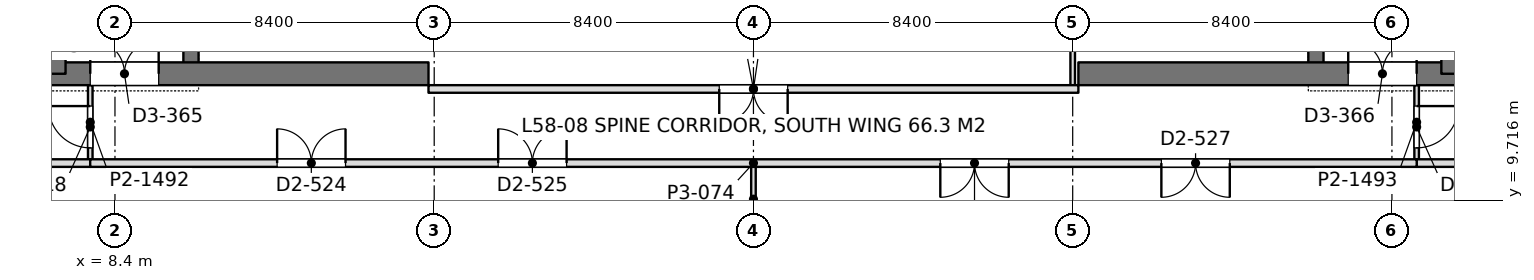
"""IFC4 building model, lengths in metres.
Left out: names, types, materials, properties, quantities, classifications, styles, units other than length and angle.
Written with IfcOpenShell. Run it as: python <this file> out.ifc"""

import sys

from ifc_helpers import new_model, si_unit, direction, frame, frame_2d, origin, place, context, subcontext, project, spatial, rectangle, extrude, element, fill, save


model = new_model("IFC4")
c1 = context("Model", 3, precision=1e-05, world=origin(), true_north=direction((0.0, 1.0)))
c2 = subcontext(c1, "Body", "Model", "MODEL_VIEW")
j1 = project(units=[si_unit("LENGTHUNIT", "METRE"), si_unit("PLANEANGLEUNIT", "RADIAN")], contexts=[c1])
p1 = place(None, origin())
s1 = spatial("IfcSite", under=j1, at=p1, CompositionType="ELEMENT")
p2 = place(p1, origin())
s2 = spatial("IfcBuilding", under=s1, at=p2, CompositionType="ELEMENT")
p3 = place(p2, frame((0.0, 0.0, 254.7)))
s3 = spatial("IfcBuildingStorey", under=s2, at=p3, CompositionType="ELEMENT", Elevation=254.7)
p4 = place(p3, frame((-1.05, 13.05, 0.0), z_axis=(0.0, 0.0, 1.0), x_axis=(1.0, 0.0, 0.0)))
e1 = element("IfcWall", 1, at=p4, inside=s3, PredefinedType="SHEAR", context=c2, shape_type="SweptSolid", body=[
    extrude(rectangle(XDim=17.7, YDim=0.6, at=frame_2d((8.85, 0.0))), origin(), (0.0, 0.0, 1.0), 4.5),
])
p5 = place(p4, frame((8.8, 0.0, 0.0)))
e2 = element("IfcOpeningElement", 2, at=p5, cuts=e1, PredefinedType="OPENING", context=c2, shape_type="SweptSolid", body=[
    extrude(rectangle(XDim=1.8, YDim=2.4, at=frame_2d((0.9, 1.2))), frame((0.0, 0.31, 0.0), z_axis=(0.0, -1.0, 0.0), x_axis=(1.0, 0.0, 0.0)), (0.0, 0.0, 1.0), 0.62),
])
p6 = place(p3, frame((6.9, 13.05, 0.0), z_axis=(0.0, 0.0, 1.0), x_axis=(0.0, 1.0, 0.0)))
e3 = element("IfcWall", 3, at=p6, inside=s3, PredefinedType="SHEAR", context=c2, shape_type="SweptSolid", body=[
    extrude(rectangle(XDim=24.3, YDim=0.4, at=frame_2d((12.15, 0.0))), origin(), (0.0, 0.0, 1.0), 4.5),
])
p7 = place(p6, frame((1.3, 0.0, 0.0)))
e4 = element("IfcOpeningElement", 4, at=p7, cuts=e3, PredefinedType="OPENING", context=c2, shape_type="SweptSolid", body=[
    extrude(rectangle(XDim=1.0, YDim=2.2, at=frame_2d((0.5, 1.1))), frame((0.0, 0.21, 0.0), z_axis=(0.0, -1.0, 0.0), x_axis=(1.0, 0.0, 0.0)), (0.0, 0.0, 1.0), 0.42),
])
p8 = place(p6, frame((22.0, 0.0, 0.0)))
e5 = element("IfcOpeningElement", 5, at=p8, cuts=e3, PredefinedType="OPENING", context=c2, shape_type="SweptSolid", body=[
    extrude(rectangle(XDim=1.0, YDim=2.2, at=frame_2d((0.5, 1.1))), frame((0.0, 0.21, 0.0), z_axis=(0.0, -1.0, 0.0), x_axis=(1.0, 0.0, 0.0)), (0.0, 0.0, 1.0), 0.42),
])
p9 = place(p6, frame((5.55, 0.0, 0.0)))
e6 = element("IfcOpeningElement", 6, at=p9, cuts=e3, PredefinedType="OPENING", context=c2, shape_type="SweptSolid", body=[
    extrude(rectangle(XDim=1.0, YDim=2.2, at=frame_2d((0.5, 1.1))), frame((0.0, 0.21, 0.0), z_axis=(0.0, -1.0, 0.0), x_axis=(1.0, 0.0, 0.0)), (0.0, 0.0, 1.0), 0.42),
])
p10 = place(p6, frame((9.55, 0.0, 0.0)))
e7 = element("IfcOpeningElement", 7, at=p10, cuts=e3, PredefinedType="OPENING", context=c2, shape_type="SweptSolid", body=[
    extrude(rectangle(XDim=1.0, YDim=2.2, at=frame_2d((0.5, 1.1))), frame((0.0, 0.21, 0.0), z_axis=(0.0, -1.0, 0.0), x_axis=(1.0, 0.0, 0.0)), (0.0, 0.0, 1.0), 0.42),
])
p11 = place(p6, frame((12.8, 0.0, 0.0)))
e8 = element("IfcOpeningElement", 8, at=p11, cuts=e3, PredefinedType="OPENING", context=c2, shape_type="SweptSolid", body=[
    extrude(rectangle(XDim=1.1, YDim=2.2, at=frame_2d((0.55, 1.1))), frame((0.0, 0.21, 0.0), z_axis=(0.0, -1.0, 0.0), x_axis=(1.0, 0.0, 0.0)), (0.0, 0.0, 1.0), 0.42),
])
p12 = place(p6, frame((15.538, 0.0, 0.0)))
e9 = element("IfcOpeningElement", 9, at=p12, cuts=e3, PredefinedType="OPENING", context=c2, shape_type="SweptSolid", body=[
    extrude(rectangle(XDim=1.1, YDim=2.2, at=frame_2d((0.55, 1.1))), frame((0.0, 0.21, 0.0), z_axis=(0.0, -1.0, 0.0), x_axis=(1.0, 0.0, 0.0)), (0.0, 0.0, 1.0), 0.42),
])
p13 = place(p6, frame((18.262, 0.0, 0.0)))
e10 = element("IfcOpeningElement", 10, at=p13, cuts=e3, PredefinedType="OPENING", context=c2, shape_type="SweptSolid", body=[
    extrude(rectangle(XDim=1.1, YDim=2.2, at=frame_2d((0.55, 1.1))), frame((0.0, 0.21, 0.0), z_axis=(0.0, -1.0, 0.0), x_axis=(1.0, 0.0, 0.0)), (0.0, 0.0, 1.0), 0.42),
])
p14 = place(p3, frame((10.4, 13.05, 0.0), z_axis=(0.0, 0.0, 1.0), x_axis=(0.0, 1.0, 0.0)))
e11 = element("IfcWall", 11, at=p14, inside=s3, PredefinedType="SHEAR", context=c2, shape_type="SweptSolid", body=[
    extrude(rectangle(XDim=24.3, YDim=0.4, at=frame_2d((12.15, 0.0))), origin(), (0.0, 0.0, 1.0), 4.5),
])
p15 = place(p14, frame((15.75, 0.0, 0.0)))
e12 = element("IfcOpeningElement", 12, at=p15, cuts=e11, PredefinedType="OPENING", context=c2, shape_type="SweptSolid", body=[
    extrude(rectangle(XDim=1.1, YDim=2.2, at=frame_2d((0.55, 1.1))), frame((0.0, 0.21, 0.0), z_axis=(0.0, -1.0, 0.0), x_axis=(1.0, 0.0, 0.0)), (0.0, 0.0, 1.0), 0.42),
])
p16 = place(p14, frame((18.6, 0.0, 0.0)))
e13 = element("IfcOpeningElement", 13, at=p16, cuts=e11, PredefinedType="OPENING", context=c2, shape_type="SweptSolid", body=[
    extrude(rectangle(XDim=1.1, YDim=2.2, at=frame_2d((0.55, 1.1))), frame((0.0, 0.21, 0.0), z_axis=(0.0, -1.0, 0.0), x_axis=(1.0, 0.0, 0.0)), (0.0, 0.0, 1.0), 0.42),
])
p17 = place(p14, frame((21.45, 0.0, 0.0)))
e14 = element("IfcOpeningElement", 14, at=p17, cuts=e11, PredefinedType="OPENING", context=c2, shape_type="SweptSolid", body=[
    extrude(rectangle(XDim=1.1, YDim=2.2, at=frame_2d((0.55, 1.1))), frame((0.0, 0.21, 0.0), z_axis=(0.0, -1.0, 0.0), x_axis=(1.0, 0.0, 0.0)), (0.0, 0.0, 1.0), 0.42),
])
p18 = place(p14, frame((8.65, 0.0, 0.0)))
e15 = element("IfcOpeningElement", 15, at=p18, cuts=e11, PredefinedType="OPENING", context=c2, shape_type="SweptSolid", body=[
    extrude(rectangle(XDim=1.8, YDim=2.4, at=frame_2d((0.9, 1.2))), frame((0.0, 0.21, 0.0), z_axis=(0.0, -1.0, 0.0), x_axis=(1.0, 0.0, 0.0)), (0.0, 0.0, 1.0), 0.42),
])
p19 = place(p3, frame((33.75, 13.05, 0.0), z_axis=(0.0, 0.0, 1.0), x_axis=(1.0, 0.0, 0.0)))
e16 = element("IfcWall", 16, at=p19, inside=s3, PredefinedType="SHEAR", context=c2, shape_type="SweptSolid", body=[
    extrude(rectangle(XDim=17.7, YDim=0.6, at=frame_2d((8.85, 0.0))), origin(), (0.0, 0.0, 1.0), 4.5),
])
p20 = place(p19, frame((7.1, 0.0, 0.0)))
e17 = element("IfcOpeningElement", 17, at=p20, cuts=e16, PredefinedType="OPENING", context=c2, shape_type="SweptSolid", body=[
    extrude(rectangle(XDim=1.8, YDim=2.4, at=frame_2d((0.9, 1.2))), frame((0.0, 0.31, 0.0), z_axis=(0.0, -1.0, 0.0), x_axis=(1.0, 0.0, 0.0)), (0.0, 0.0, 1.0), 0.62),
])
p21 = place(p3, frame((43.5, 13.05, 0.0), z_axis=(0.0, 0.0, 1.0), x_axis=(0.0, 1.0, 0.0)))
e18 = element("IfcWall", 18, at=p21, inside=s3, PredefinedType="SHEAR", context=c2, shape_type="SweptSolid", body=[
    extrude(rectangle(XDim=24.3, YDim=0.4, at=frame_2d((12.15, 0.0))), origin(), (0.0, 0.0, 1.0), 4.5),
])
p22 = place(p21, frame((1.3, 0.0, 0.0)))
e19 = element("IfcOpeningElement", 19, at=p22, cuts=e18, PredefinedType="OPENING", context=c2, shape_type="SweptSolid", body=[
    extrude(rectangle(XDim=1.0, YDim=2.2, at=frame_2d((0.5, 1.1))), frame((0.0, 0.21, 0.0), z_axis=(0.0, -1.0, 0.0), x_axis=(1.0, 0.0, 0.0)), (0.0, 0.0, 1.0), 0.42),
])
p23 = place(p21, frame((22.0, 0.0, 0.0)))
e20 = element("IfcOpeningElement", 20, at=p23, cuts=e18, PredefinedType="OPENING", context=c2, shape_type="SweptSolid", body=[
    extrude(rectangle(XDim=1.0, YDim=2.2, at=frame_2d((0.5, 1.1))), frame((0.0, 0.21, 0.0), z_axis=(0.0, -1.0, 0.0), x_axis=(1.0, 0.0, 0.0)), (0.0, 0.0, 1.0), 0.42),
])
p24 = place(p21, frame((5.55, 0.0, 0.0)))
e21 = element("IfcOpeningElement", 21, at=p24, cuts=e18, PredefinedType="OPENING", context=c2, shape_type="SweptSolid", body=[
    extrude(rectangle(XDim=1.0, YDim=2.2, at=frame_2d((0.5, 1.1))), frame((0.0, 0.21, 0.0), z_axis=(0.0, -1.0, 0.0), x_axis=(1.0, 0.0, 0.0)), (0.0, 0.0, 1.0), 0.42),
])
p25 = place(p21, frame((9.55, 0.0, 0.0)))
e22 = element("IfcOpeningElement", 22, at=p25, cuts=e18, PredefinedType="OPENING", context=c2, shape_type="SweptSolid", body=[
    extrude(rectangle(XDim=1.0, YDim=2.2, at=frame_2d((0.5, 1.1))), frame((0.0, 0.21, 0.0), z_axis=(0.0, -1.0, 0.0), x_axis=(1.0, 0.0, 0.0)), (0.0, 0.0, 1.0), 0.42),
])
p26 = place(p21, frame((12.8, 0.0, 0.0)))
e23 = element("IfcOpeningElement", 23, at=p26, cuts=e18, PredefinedType="OPENING", context=c2, shape_type="SweptSolid", body=[
    extrude(rectangle(XDim=1.1, YDim=2.2, at=frame_2d((0.55, 1.1))), frame((0.0, 0.21, 0.0), z_axis=(0.0, -1.0, 0.0), x_axis=(1.0, 0.0, 0.0)), (0.0, 0.0, 1.0), 0.42),
])
p27 = place(p21, frame((15.538, 0.0, 0.0)))
e24 = element("IfcOpeningElement", 24, at=p27, cuts=e18, PredefinedType="OPENING", context=c2, shape_type="SweptSolid", body=[
    extrude(rectangle(XDim=1.1, YDim=2.2, at=frame_2d((0.55, 1.1))), frame((0.0, 0.21, 0.0), z_axis=(0.0, -1.0, 0.0), x_axis=(1.0, 0.0, 0.0)), (0.0, 0.0, 1.0), 0.42),
])
p28 = place(p21, frame((18.262, 0.0, 0.0)))
e25 = element("IfcOpeningElement", 25, at=p28, cuts=e18, PredefinedType="OPENING", context=c2, shape_type="SweptSolid", body=[
    extrude(rectangle(XDim=1.1, YDim=2.2, at=frame_2d((0.55, 1.1))), frame((0.0, 0.21, 0.0), z_axis=(0.0, -1.0, 0.0), x_axis=(1.0, 0.0, 0.0)), (0.0, 0.0, 1.0), 0.42),
])
p29 = place(p3, frame((40.0, 13.05, 0.0), z_axis=(0.0, 0.0, 1.0), x_axis=(0.0, 1.0, 0.0)))
e26 = element("IfcWall", 26, at=p29, inside=s3, PredefinedType="SHEAR", context=c2, shape_type="SweptSolid", body=[
    extrude(rectangle(XDim=24.3, YDim=0.4, at=frame_2d((12.15, 0.0))), origin(), (0.0, 0.0, 1.0), 4.5),
])
p30 = place(p29, frame((15.75, 0.0, 0.0)))
e27 = element("IfcOpeningElement", 27, at=p30, cuts=e26, PredefinedType="OPENING", context=c2, shape_type="SweptSolid", body=[
    extrude(rectangle(XDim=1.1, YDim=2.2, at=frame_2d((0.55, 1.1))), frame((0.0, 0.21, 0.0), z_axis=(0.0, -1.0, 0.0), x_axis=(1.0, 0.0, 0.0)), (0.0, 0.0, 1.0), 0.42),
])
p31 = place(p29, frame((18.6, 0.0, 0.0)))
e28 = element("IfcOpeningElement", 28, at=p31, cuts=e26, PredefinedType="OPENING", context=c2, shape_type="SweptSolid", body=[
    extrude(rectangle(XDim=1.1, YDim=2.2, at=frame_2d((0.55, 1.1))), frame((0.0, 0.21, 0.0), z_axis=(0.0, -1.0, 0.0), x_axis=(1.0, 0.0, 0.0)), (0.0, 0.0, 1.0), 0.42),
])
p32 = place(p29, frame((21.45, 0.0, 0.0)))
e29 = element("IfcOpeningElement", 29, at=p32, cuts=e26, PredefinedType="OPENING", context=c2, shape_type="SweptSolid", body=[
    extrude(rectangle(XDim=1.1, YDim=2.2, at=frame_2d((0.55, 1.1))), frame((0.0, 0.21, 0.0), z_axis=(0.0, -1.0, 0.0), x_axis=(1.0, 0.0, 0.0)), (0.0, 0.0, 1.0), 0.42),
])
p33 = place(p29, frame((8.65, 0.0, 0.0)))
e30 = element("IfcOpeningElement", 30, at=p33, cuts=e26, PredefinedType="OPENING", context=c2, shape_type="SweptSolid", body=[
    extrude(rectangle(XDim=1.8, YDim=2.4, at=frame_2d((0.9, 1.2))), frame((0.0, 0.21, 0.0), z_axis=(0.0, -1.0, 0.0), x_axis=(1.0, 0.0, 0.0)), (0.0, 0.0, 1.0), 0.42),
])
p34 = place(p29, frame((1.5, 0.0, 0.0)))
e31 = element("IfcOpeningElement", 31, at=p34, cuts=e26, PredefinedType="OPENING", context=c2, shape_type="SweptSolid", body=[
    extrude(rectangle(XDim=1.8, YDim=2.4, at=frame_2d((0.9, 1.2))), frame((0.0, 0.21, 0.0), z_axis=(0.0, -1.0, 0.0), x_axis=(1.0, 0.0, 0.0)), (0.0, 0.0, 1.0), 0.42),
])
p35 = place(p3, frame((33.6, 12.6, 0.0), z_axis=(0.0, 0.0, 1.0), x_axis=(0.0, 1.0, 0.0)))
e32 = element("IfcWall", 32, at=p35, inside=s3, PredefinedType="PARTITIONING", context=c2, shape_type="SweptSolid", body=[
    extrude(rectangle(XDim=4.502, YDim=0.12, at=frame_2d((2.251, 0.0))), origin(), (0.0, 0.0, 1.0), 3.66),
])
p36 = place(p3, frame((25.2, 8.899, 0.0), z_axis=(0.0, 0.0, 1.0), x_axis=(0.0, 1.0, 0.0)))
e33 = element("IfcWall", 33, at=p36, inside=s3, PredefinedType="PARTITIONING", context=c2, shape_type="SweptSolid", body=[
    extrude(rectangle(XDim=1.703, YDim=0.12, at=frame_2d((0.852, 0.0))), origin(), (0.0, 0.0, 1.0), 3.8),
])
p37 = place(p3, frame((7.748, 10.7, 0.0), z_axis=(0.0, 0.0, 1.0), x_axis=(1.0, 0.0, 0.0)))
e34 = element("IfcWall", 34, at=p37, inside=s3, PredefinedType="PARTITIONING", context=c2, shape_type="SweptSolid", body=[
    extrude(rectangle(XDim=34.904, YDim=0.2, at=frame_2d((17.452, 0.0))), origin(), (0.0, 0.0, 1.0), 3.8),
])
p38 = place(p37, frame((4.919, 0.0, 0.0)))
e35 = element("IfcOpeningElement", 35, at=p38, cuts=e34, PredefinedType="OPENING", context=c2, shape_type="SweptSolid", body=[
    extrude(rectangle(XDim=1.8, YDim=2.2, at=frame_2d((0.9, 1.1))), frame((0.0, 0.11, 0.0), z_axis=(0.0, -1.0, 0.0), x_axis=(1.0, 0.0, 0.0)), (0.0, 0.0, 1.0), 0.22),
])
p39 = place(p37, frame((10.735, 0.0, 0.0)))
e36 = element("IfcOpeningElement", 36, at=p39, cuts=e34, PredefinedType="OPENING", context=c2, shape_type="SweptSolid", body=[
    extrude(rectangle(XDim=1.8, YDim=2.2, at=frame_2d((0.9, 1.1))), frame((0.0, 0.11, 0.0), z_axis=(0.0, -1.0, 0.0), x_axis=(1.0, 0.0, 0.0)), (0.0, 0.0, 1.0), 0.22),
])
p40 = place(p37, frame((22.369, 0.0, 0.0)))
e37 = element("IfcOpeningElement", 37, at=p40, cuts=e34, PredefinedType="OPENING", context=c2, shape_type="SweptSolid", body=[
    extrude(rectangle(XDim=1.8, YDim=2.2, at=frame_2d((0.9, 1.1))), frame((0.0, 0.11, 0.0), z_axis=(0.0, -1.0, 0.0), x_axis=(1.0, 0.0, 0.0)), (0.0, 0.0, 1.0), 0.22),
])
p41 = place(p37, frame((28.185, 0.0, 0.0)))
e38 = element("IfcOpeningElement", 38, at=p41, cuts=e34, PredefinedType="OPENING", context=c2, shape_type="SweptSolid", body=[
    extrude(rectangle(XDim=1.8, YDim=2.2, at=frame_2d((0.9, 1.1))), frame((0.0, 0.11, 0.0), z_axis=(0.0, -1.0, 0.0), x_axis=(1.0, 0.0, 0.0)), (0.0, 0.0, 1.0), 0.22),
])
p42 = place(p3, frame((7.75, 10.798, 0.0), z_axis=(0.0, 0.0, 1.0), x_axis=(0.0, 1.0, 0.0)))
e39 = element("IfcWall", 39, at=p42, inside=s3, PredefinedType="PARTITIONING", context=c2, shape_type="SweptSolid", body=[
    extrude(rectangle(XDim=1.954, YDim=0.12, at=frame_2d((0.977, 0.0))), origin(), (0.0, 0.0, 1.0), 4.35),
])
p43 = place(p42, frame((0.302, 0.0, 0.0)))
e40 = element("IfcOpeningElement", 40, at=p43, cuts=e39, PredefinedType="OPENING", context=c2, shape_type="SweptSolid", body=[
    extrude(rectangle(XDim=1.1, YDim=2.4, at=frame_2d((0.55, 1.2))), frame((0.0, 0.07, 0.0), z_axis=(0.0, -1.0, 0.0), x_axis=(1.0, 0.0, 0.0)), (0.0, 0.0, 1.0), 0.14),
])
p44 = place(p3, frame((42.65, 10.798, 0.0), z_axis=(0.0, 0.0, 1.0), x_axis=(0.0, 1.0, 0.0)))
e41 = element("IfcWall", 41, at=p44, inside=s3, PredefinedType="PARTITIONING", context=c2, shape_type="SweptSolid", body=[
    extrude(rectangle(XDim=1.954, YDim=0.12, at=frame_2d((0.977, 0.0))), origin(), (0.0, 0.0, 1.0), 4.35),
])
p45 = place(p44, frame((0.302, 0.0, 0.0)))
e42 = element("IfcOpeningElement", 42, at=p45, cuts=e41, PredefinedType="OPENING", context=c2, shape_type="SweptSolid", body=[
    extrude(rectangle(XDim=1.1, YDim=2.4, at=frame_2d((0.55, 1.2))), frame((0.0, 0.07, 0.0), z_axis=(0.0, -1.0, 0.0), x_axis=(1.0, 0.0, 0.0)), (0.0, 0.0, 1.0), 0.14),
])
for number, where, z_axis, x_axis in (
    (43, (1.2, 10.7, 0.0), (0.0, 0.0, 1.0), (1.0, 0.0, 0.0)),
    (44, (42.648, 10.7, 0.0), (0.0, 0.0, 1.0), (1.0, 0.0, 0.0)),
):
    element("IfcWall", number, at=place(p3, frame(where, z_axis=z_axis, x_axis=x_axis)), inside=s3, PredefinedType="PARTITIONING", context=c2, shape_type="SweptSolid", body=[
        extrude(rectangle(XDim=6.552, YDim=0.2, at=frame_2d((3.276, 0.0))), origin(), (0.0, 0.0, 1.0), 4.35),
    ])
p46 = place(p3, frame((16.65, 12.65, 0.0), z_axis=(0.0, 0.0, 1.0), x_axis=(1.0, 0.0, 0.0)))
e45 = element("IfcWall", 45, at=p46, inside=s3, PredefinedType="PARTITIONING", context=c2, shape_type="SweptSolid", body=[
    extrude(rectangle(XDim=17.1, YDim=0.2, at=frame_2d((8.55, 0.0))), origin(), (0.0, 0.0, 1.0), 3.8),
])
p47 = place(p46, frame((7.65, 0.0, 0.0)))
e46 = element("IfcOpeningElement", 46, at=p47, cuts=e45, PredefinedType="OPENING", context=c2, shape_type="SweptSolid", body=[
    extrude(rectangle(XDim=1.8, YDim=2.2, at=frame_2d((0.9, 1.1))), frame((0.0, 0.11, 0.0), z_axis=(0.0, -1.0, 0.0), x_axis=(1.0, 0.0, 0.0)), (0.0, 0.0, 1.0), 0.22),
])
p48 = place(p5, origin())
e47 = element("IfcDoor", 47, at=p48, inside=s3, OperationType="DOUBLE_DOOR_SINGLE_SWING", PredefinedType="DOOR", context=c2, shape_type="SweptSolid", body=[
    extrude(rectangle(XDim=1.8, YDim=2.4, at=frame_2d((0.9, 1.2))), frame((0.0, 0.025, 0.0), z_axis=(0.0, -1.0, 0.0), x_axis=(1.0, 0.0, 0.0)), (0.0, 0.0, 1.0), 0.05),
])
fill(e2, e47)
p49 = place(p20, origin())
e48 = element("IfcDoor", 48, at=p49, inside=s3, OperationType="DOUBLE_DOOR_SINGLE_SWING", PredefinedType="DOOR", context=c2, shape_type="SweptSolid", body=[
    extrude(rectangle(XDim=1.8, YDim=2.4, at=frame_2d((0.9, 1.2))), frame((0.0, 0.025, 0.0), z_axis=(0.0, -1.0, 0.0), x_axis=(1.0, 0.0, 0.0)), (0.0, 0.0, 1.0), 0.05),
])
fill(e17, e48)
p50 = place(p38, origin())
e49 = element("IfcDoor", 49, at=p50, inside=s3, OperationType="DOUBLE_DOOR_SINGLE_SWING", PredefinedType="DOOR", context=c2, shape_type="SweptSolid", body=[
    extrude(rectangle(XDim=1.8, YDim=2.2, at=frame_2d((0.9, 1.1))), frame((0.0, 0.025, 0.0), z_axis=(0.0, -1.0, 0.0), x_axis=(1.0, 0.0, 0.0)), (0.0, 0.0, 1.0), 0.05),
])
fill(e35, e49)
p51 = place(p39, origin())
e50 = element("IfcDoor", 50, at=p51, inside=s3, OperationType="DOUBLE_DOOR_SINGLE_SWING", PredefinedType="DOOR", context=c2, shape_type="SweptSolid", body=[
    extrude(rectangle(XDim=1.8, YDim=2.2, at=frame_2d((0.9, 1.1))), frame((0.0, 0.025, 0.0), z_axis=(0.0, -1.0, 0.0), x_axis=(1.0, 0.0, 0.0)), (0.0, 0.0, 1.0), 0.05),
])
fill(e36, e50)
p52 = place(p40, frame((1.8, 0.0, 0.0), z_axis=(0.0, 0.0, 1.0), x_axis=(-1.0, 0.0, 0.0)))
e51 = element("IfcDoor", 51, at=p52, inside=s3, OperationType="DOUBLE_DOOR_SINGLE_SWING", PredefinedType="DOOR", context=c2, shape_type="SweptSolid", body=[
    extrude(rectangle(XDim=1.8, YDim=2.2, at=frame_2d((0.9, 1.1))), frame((0.0, 0.025, 0.0), z_axis=(0.0, -1.0, 0.0), x_axis=(1.0, 0.0, 0.0)), (0.0, 0.0, 1.0), 0.05),
])
fill(e37, e51)
p53 = place(p41, frame((1.8, 0.0, 0.0), z_axis=(0.0, 0.0, 1.0), x_axis=(-1.0, 0.0, 0.0)))
e52 = element("IfcDoor", 52, at=p53, inside=s3, OperationType="DOUBLE_DOOR_SINGLE_SWING", PredefinedType="DOOR", context=c2, shape_type="SweptSolid", body=[
    extrude(rectangle(XDim=1.8, YDim=2.2, at=frame_2d((0.9, 1.1))), frame((0.0, 0.025, 0.0), z_axis=(0.0, -1.0, 0.0), x_axis=(1.0, 0.0, 0.0)), (0.0, 0.0, 1.0), 0.05),
])
fill(e38, e52)
p54 = place(p43, origin())
e53 = element("IfcDoor", 53, at=p54, inside=s3, OperationType="SINGLE_SWING_RIGHT", PredefinedType="DOOR", context=c2, shape_type="SweptSolid", body=[
    extrude(rectangle(XDim=1.1, YDim=2.4, at=frame_2d((0.55, 1.2))), frame((0.0, 0.025, 0.0), z_axis=(0.0, -1.0, 0.0), x_axis=(1.0, 0.0, 0.0)), (0.0, 0.0, 1.0), 0.05),
])
fill(e40, e53)
p55 = place(p45, frame((1.1, 0.0, 0.0), z_axis=(0.0, 0.0, 1.0), x_axis=(-1.0, 0.0, 0.0)))
e54 = element("IfcDoor", 54, at=p55, inside=s3, OperationType="SINGLE_SWING_LEFT", PredefinedType="DOOR", context=c2, shape_type="SweptSolid", body=[
    extrude(rectangle(XDim=1.1, YDim=2.4, at=frame_2d((0.55, 1.2))), frame((0.0, 0.025, 0.0), z_axis=(0.0, -1.0, 0.0), x_axis=(1.0, 0.0, 0.0)), (0.0, 0.0, 1.0), 0.05),
])
fill(e42, e54)
p56 = place(p47, frame((1.8, 0.0, 0.0), z_axis=(0.0, 0.0, 1.0), x_axis=(-1.0, 0.0, 0.0)))
e55 = element("IfcDoor", 55, at=p56, inside=s3, OperationType="DOUBLE_DOOR_SINGLE_SWING", PredefinedType="DOOR", context=c2, shape_type="SweptSolid", body=[
    extrude(rectangle(XDim=1.8, YDim=2.2, at=frame_2d((0.9, 1.1))), frame((0.0, 0.025, 0.0), z_axis=(0.0, -1.0, 0.0), x_axis=(1.0, 0.0, 0.0)), (0.0, 0.0, 1.0), 0.05),
])
fill(e46, e55)
save(model, sys.argv[1])
